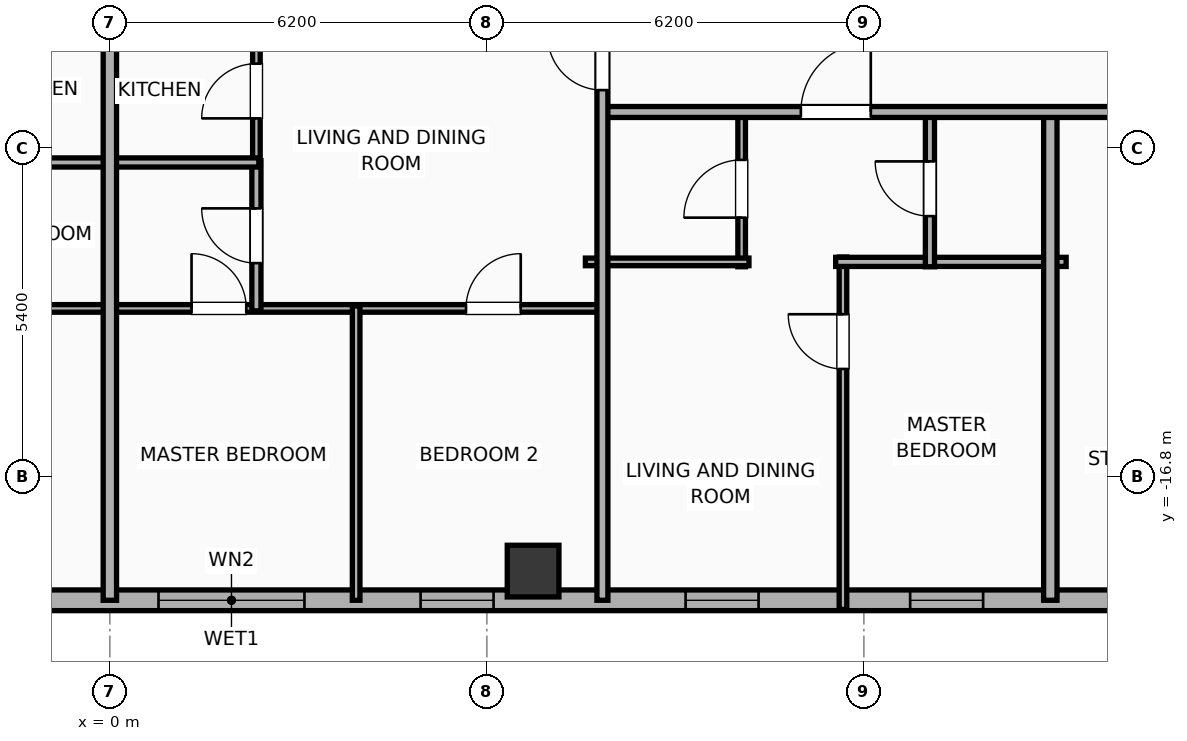
"""IFC4 building model, lengths in metres.
Left out: names, types, materials, properties, quantities, classifications, styles, units other than length and angle.
Written with IfcOpenShell. Run it as: python <this file> out.ifc"""

import sys

from ifc_helpers import new_model, si_unit, direction, frame, frame_2d, origin, origin_2d, place, context, subcontext, project, spatial, rectangle, hollow_rectangle, extrude, element, fill, save


model = new_model("IFC4")
c1 = context("Model", 3, precision=1e-05, world=origin(), true_north=direction((0.0, 1.0)))
c2 = subcontext(c1, "Body", "Model", "MODEL_VIEW")
j1 = project(units=[si_unit("LENGTHUNIT", "METRE"), si_unit("PLANEANGLEUNIT", "RADIAN")], contexts=[c1])
p1 = place(None, origin())
s1 = spatial("IfcSite", under=j1, at=p1, CompositionType="ELEMENT")
p2 = place(p1, origin())
s2 = spatial("IfcBuilding", under=s1, at=p2, CompositionType="ELEMENT")
p3 = place(p2, frame((0.0, 0.0, 223.6)))
s3 = spatial("IfcBuildingStorey", under=s2, at=p3, CompositionType="ELEMENT", Elevation=223.6)
p4 = place(p3, frame((6.96, -18.35, 0.0), z_axis=(0.0, 0.0, 1.0), x_axis=(1.0, 0.0, 0.0)))
e1 = element("IfcColumn", 1, at=p4, inside=s3, PredefinedType="COLUMN", context=c2, shape_type="SweptSolid", body=[
    extrude(hollow_rectangle(XDim=0.85, YDim=0.85, WallThickness=0.028, at=origin_2d()), origin(), (0.0, 0.0, 1.0), 3.9),
])
p5 = place(p3, frame((26.783, -18.83, 0.0), z_axis=(0.0, 0.0, 1.0), x_axis=(-1.0, 0.0, 0.0)))
e2 = element("IfcWall", 2, at=p5, inside=s3, PredefinedType="ELEMENTEDWALL", context=c2, shape_type="SweptSolid", body=[
    extrude(rectangle(XDim=49.566, YDim=0.34, at=frame_2d((24.783, 0.0))), origin(), (0.0, 0.0, 1.0), 3.65),
])
p6 = place(p5, frame((23.583, 0.0, 0.75)))
e3 = element("IfcOpeningElement", 3, at=p6, cuts=e2, PredefinedType="OPENING", context=c2, shape_type="SweptSolid", body=[
    extrude(rectangle(XDim=2.4, YDim=2.1, at=frame_2d((1.2, 1.05))), frame((0.0, 0.18, 0.0), z_axis=(0.0, -1.0, 0.0), x_axis=(1.0, 0.0, 0.0)), (0.0, 0.0, 1.0), 0.36),
])
p7 = place(p5, frame((41.756, 0.0, 0.75)))
e4 = element("IfcOpeningElement", 4, at=p7, cuts=e2, PredefinedType="OPENING", context=c2, shape_type="SweptSolid", body=[
    extrude(rectangle(XDim=2.4, YDim=2.1, at=frame_2d((1.2, 1.05))), frame((0.0, 0.18, 0.0), z_axis=(0.0, -1.0, 0.0), x_axis=(1.0, 0.0, 0.0)), (0.0, 0.0, 1.0), 0.36),
])
p8 = place(p5, frame((47.222, 0.0, 0.75)))
e5 = element("IfcOpeningElement", 5, at=p8, cuts=e2, PredefinedType="OPENING", context=c2, shape_type="SweptSolid", body=[
    extrude(rectangle(XDim=1.2, YDim=2.05, at=frame_2d((0.6, 1.025))), frame((0.0, 0.18, 0.0), z_axis=(0.0, -1.0, 0.0), x_axis=(1.0, 0.0, 0.0)), (0.0, 0.0, 1.0), 0.36),
])
p9 = place(p5, frame((45.08, 0.0, 0.75)))
e6 = element("IfcOpeningElement", 6, at=p9, cuts=e2, PredefinedType="OPENING", context=c2, shape_type="SweptSolid", body=[
    extrude(rectangle(XDim=1.2, YDim=2.05, at=frame_2d((0.6, 1.025))), frame((0.0, 0.18, 0.0), z_axis=(0.0, -1.0, 0.0), x_axis=(1.0, 0.0, 0.0)), (0.0, 0.0, 1.0), 0.36),
])
p10 = place(p5, frame((37.289, 0.0, 0.75)))
e7 = element("IfcOpeningElement", 7, at=p10, cuts=e2, PredefinedType="OPENING", context=c2, shape_type="SweptSolid", body=[
    extrude(rectangle(XDim=1.2, YDim=2.05, at=frame_2d((0.6, 1.025))), frame((0.0, 0.18, 0.0), z_axis=(0.0, -1.0, 0.0), x_axis=(1.0, 0.0, 0.0)), (0.0, 0.0, 1.0), 0.36),
])
p11 = place(p5, frame((16.115, 0.0, 0.75)))
e8 = element("IfcOpeningElement", 8, at=p11, cuts=e2, PredefinedType="OPENING", context=c2, shape_type="SweptSolid", body=[
    extrude(rectangle(XDim=1.2, YDim=2.05, at=frame_2d((0.6, 1.025))), frame((0.0, 0.18, 0.0), z_axis=(0.0, -1.0, 0.0), x_axis=(1.0, 0.0, 0.0)), (0.0, 0.0, 1.0), 0.36),
])
p12 = place(p5, frame((12.422, 0.0, 0.75)))
e9 = element("IfcOpeningElement", 9, at=p12, cuts=e2, PredefinedType="OPENING", context=c2, shape_type="SweptSolid", body=[
    extrude(rectangle(XDim=1.2, YDim=2.05, at=frame_2d((0.6, 1.025))), frame((0.0, 0.18, 0.0), z_axis=(0.0, -1.0, 0.0), x_axis=(1.0, 0.0, 0.0)), (0.0, 0.0, 1.0), 0.36),
])
p13 = place(p5, frame((8.09, 0.0, 0.75)))
e10 = element("IfcOpeningElement", 10, at=p13, cuts=e2, PredefinedType="OPENING", context=c2, shape_type="SweptSolid", body=[
    extrude(rectangle(XDim=1.2, YDim=2.05, at=frame_2d((0.6, 1.025))), frame((0.0, 0.18, 0.0), z_axis=(0.0, -1.0, 0.0), x_axis=(1.0, 0.0, 0.0)), (0.0, 0.0, 1.0), 0.36),
])
p14 = place(p5, frame((4.637, 0.0, 0.75)))
e11 = element("IfcOpeningElement", 11, at=p14, cuts=e2, PredefinedType="OPENING", context=c2, shape_type="SweptSolid", body=[
    extrude(rectangle(XDim=1.2, YDim=2.05, at=frame_2d((0.6, 1.025))), frame((0.0, 0.18, 0.0), z_axis=(0.0, -1.0, 0.0), x_axis=(1.0, 0.0, 0.0)), (0.0, 0.0, 1.0), 0.36),
])
p15 = place(p5, frame((1.811, 0.0, 0.75)))
e12 = element("IfcOpeningElement", 12, at=p15, cuts=e2, PredefinedType="OPENING", context=c2, shape_type="SweptSolid", body=[
    extrude(rectangle(XDim=1.2, YDim=2.05, at=frame_2d((0.6, 1.025))), frame((0.0, 0.18, 0.0), z_axis=(0.0, -1.0, 0.0), x_axis=(1.0, 0.0, 0.0)), (0.0, 0.0, 1.0), 0.36),
])
p16 = place(p5, frame((32.253, 0.0, 0.75)))
e13 = element("IfcOpeningElement", 13, at=p16, cuts=e2, PredefinedType="OPENING", context=c2, shape_type="SweptSolid", body=[
    extrude(rectangle(XDim=1.2, YDim=2.05, at=frame_2d((0.6, 1.025))), frame((0.0, 0.18, 0.0), z_axis=(0.0, -1.0, 0.0), x_axis=(1.0, 0.0, 0.0)), (0.0, 0.0, 1.0), 0.36),
])
p17 = place(p5, frame((27.853, 0.0, 0.75)))
e14 = element("IfcOpeningElement", 14, at=p17, cuts=e2, PredefinedType="OPENING", context=c2, shape_type="SweptSolid", body=[
    extrude(rectangle(XDim=1.2, YDim=2.05, at=frame_2d((0.6, 1.025))), frame((0.0, 0.18, 0.0), z_axis=(0.0, -1.0, 0.0), x_axis=(1.0, 0.0, 0.0)), (0.0, 0.0, 1.0), 0.36),
])
p18 = place(p5, frame((20.473, 0.0, 0.75)))
e15 = element("IfcOpeningElement", 15, at=p18, cuts=e2, PredefinedType="OPENING", context=c2, shape_type="SweptSolid", body=[
    extrude(rectangle(XDim=1.2, YDim=2.05, at=frame_2d((0.6, 1.025))), frame((0.0, 0.18, 0.0), z_axis=(0.0, -1.0, 0.0), x_axis=(1.0, 0.0, 0.0)), (0.0, 0.0, 1.0), 0.36),
])
p19 = place(p3, frame((12.056, -18.98, 0.0), z_axis=(0.0, 0.0, 1.0), x_axis=(0.0, 1.0, 0.0)))
e16 = element("IfcWall", 16, at=p19, inside=s3, PredefinedType="PARTITIONING", context=c2, shape_type="SweptSolid", body=[
    extrude(rectangle(XDim=5.795, YDim=0.125, at=frame_2d((2.897, 0.0))), origin(), (0.0, 0.0, 1.0), 3.65),
])
p20 = place(p19, frame((3.954, 0.0, 0.0)))
e17 = element("IfcOpeningElement", 17, at=p20, cuts=e16, PredefinedType="OPENING", context=c2, shape_type="SweptSolid", body=[
    extrude(rectangle(XDim=0.9, YDim=2.05, at=frame_2d((0.45, 1.025))), frame((0.0, 0.073, 0.0), z_axis=(0.0, -1.0, 0.0), x_axis=(1.0, 0.0, 0.0)), (0.0, 0.0, 1.0), 0.145),
])
p21 = place(p3, frame((11.936, -13.265, 0.0), z_axis=(0.0, 0.0, 1.0), x_axis=(1.0, 0.0, 0.0)))
e18 = element("IfcWall", 18, at=p21, inside=s3, PredefinedType="PLUMBINGWALL", context=c2, shape_type="SweptSolid", body=[
    extrude(rectangle(XDim=3.79, YDim=0.15, at=frame_2d((1.895, 0.0))), origin(), (0.0, 0.0, 1.0), 3.65),
])
p22 = place(p3, frame((10.39, -13.345, 0.0), z_axis=(0.0, 0.0, 1.0), x_axis=(0.0, 1.0, 0.0)))
e19 = element("IfcWall", 19, at=p22, inside=s3, PredefinedType="PARTITIONING", context=c2, shape_type="SweptSolid", body=[
    extrude(rectangle(XDim=2.565, YDim=0.125, at=frame_2d((1.282, 0.0))), origin(), (0.0, 0.0, 1.0), 3.65),
])
p23 = place(p22, frame((0.808, 0.0, 0.0)))
e20 = element("IfcOpeningElement", 20, at=p23, cuts=e19, PredefinedType="OPENING", context=c2, shape_type="SweptSolid", body=[
    extrude(rectangle(XDim=0.95, YDim=2.05, at=frame_2d((0.475, 1.025))), frame((0.0, 0.073, 0.0), z_axis=(0.0, -1.0, 0.0), x_axis=(1.0, 0.0, 0.0)), (0.0, 0.0, 1.0), 0.145),
])
p24 = place(p3, frame((7.82, -13.265, 0.0), z_axis=(0.0, 0.0, 1.0), x_axis=(1.0, 0.0, 0.0)))
e21 = element("IfcWall", 21, at=p24, inside=s3, PredefinedType="PARTITIONING", context=c2, shape_type="SweptSolid", body=[
    extrude(rectangle(XDim=2.69, YDim=0.125, at=frame_2d((1.345, 0.0))), origin(), (0.0, 0.0, 1.0), 3.65),
])
p25 = place(p3, frame((13.486, -13.345, 0.0), z_axis=(0.0, 0.0, 1.0), x_axis=(0.0, 1.0, 0.0)))
e22 = element("IfcWall", 22, at=p25, inside=s3, PredefinedType="PLUMBINGWALL", context=c2, shape_type="SweptSolid", body=[
    extrude(rectangle(XDim=2.565, YDim=0.15, at=frame_2d((1.282, 0.0))), origin(), (0.0, 0.0, 1.0), 3.65),
])
p26 = place(p25, frame((0.833, 0.0, 0.0)))
e23 = element("IfcOpeningElement", 23, at=p26, cuts=e22, PredefinedType="OPENING", context=c2, shape_type="SweptSolid", body=[
    extrude(rectangle(XDim=0.9, YDim=2.05, at=frame_2d((0.45, 1.025))), frame((0.0, 0.085, 0.0), z_axis=(0.0, -1.0, 0.0), x_axis=(1.0, 0.0, 0.0)), (0.0, 0.0, 1.0), 0.17),
])
p27 = place(p3, frame((15.466, -18.83, 0.0), z_axis=(0.0, 0.0, 1.0), x_axis=(0.0, 1.0, 0.0)))
e24 = element("IfcWall", 24, at=p27, inside=s3, PredefinedType="PARTITIONING", context=c2, shape_type="SweptSolid", body=[
    extrude(rectangle(XDim=8.11, YDim=0.22, at=frame_2d((4.055, 0.0))), origin(), (0.0, 0.0, 1.0), 3.65),
])
p28 = place(p3, frame((8.08, -10.8, 0.0), z_axis=(0.0, 0.0, 1.0), x_axis=(1.0, 0.0, 0.0)))
e25 = element("IfcWall", 25, at=p28, inside=s3, PredefinedType="PARTITIONING", context=c2, shape_type="SweptSolid", body=[
    extrude(rectangle(XDim=22.15, YDim=0.18, at=frame_2d((11.075, 0.0))), origin(), (0.0, 0.0, 1.0), 3.65),
])
p29 = place(p28, frame((3.283, 0.0, 0.0)))
e26 = element("IfcOpeningElement", 26, at=p29, cuts=e25, PredefinedType="OPENING", context=c2, shape_type="SweptSolid", body=[
    extrude(rectangle(XDim=1.15, YDim=2.05, at=frame_2d((0.575, 1.025))), frame((0.0, 0.1, 0.0), z_axis=(0.0, -1.0, 0.0), x_axis=(1.0, 0.0, 0.0)), (0.0, 0.0, 1.0), 0.2),
])
p30 = place(p28, frame((9.229, 0.0, 0.0)))
e27 = element("IfcOpeningElement", 27, at=p30, cuts=e25, PredefinedType="OPENING", context=c2, shape_type="SweptSolid", body=[
    extrude(rectangle(XDim=1.15, YDim=2.05, at=frame_2d((0.575, 1.025))), frame((0.0, 0.1, 0.0), z_axis=(0.0, -1.0, 0.0), x_axis=(1.0, 0.0, 0.0)), (0.0, 0.0, 1.0), 0.2),
])
p31 = place(p28, frame((18.084, 0.0, 0.0)))
e28 = element("IfcOpeningElement", 28, at=p31, cuts=e25, PredefinedType="OPENING", context=c2, shape_type="SweptSolid", body=[
    extrude(rectangle(XDim=1.15, YDim=2.05, at=frame_2d((0.575, 1.025))), frame((0.0, 0.1, 0.0), z_axis=(0.0, -1.0, 0.0), x_axis=(1.0, 0.0, 0.0)), (0.0, 0.0, 1.0), 0.2),
])
p32 = place(p3, frame((-8.08, -14.03, 0.0), z_axis=(0.0, 0.0, 1.0), x_axis=(1.0, 0.0, 0.0)))
e29 = element("IfcWall", 29, at=p32, inside=s3, PredefinedType="PARTITIONING", context=c2, shape_type="SweptSolid", body=[
    extrude(rectangle(XDim=8.06, YDim=0.125, at=frame_2d((4.03, 0.0))), origin(), (0.0, 0.0, 1.0), 3.65),
])
p33 = place(p32, frame((1.323, 0.0, 0.0)))
e30 = element("IfcOpeningElement", 30, at=p33, cuts=e29, PredefinedType="OPENING", context=c2, shape_type="SweptSolid", body=[
    extrude(rectangle(XDim=0.9, YDim=2.05, at=frame_2d((0.45, 1.025))), frame((0.0, 0.073, 0.0), z_axis=(0.0, -1.0, 0.0), x_axis=(1.0, 0.0, 0.0)), (0.0, 0.0, 1.0), 0.145),
])
p34 = place(p32, frame((4.547, 0.0, 0.0)))
e31 = element("IfcOpeningElement", 31, at=p34, cuts=e29, PredefinedType="OPENING", context=c2, shape_type="SweptSolid", body=[
    extrude(rectangle(XDim=0.9, YDim=2.05, at=frame_2d((0.45, 1.025))), frame((0.0, 0.073, 0.0), z_axis=(0.0, -1.0, 0.0), x_axis=(1.0, 0.0, 0.0)), (0.0, 0.0, 1.0), 0.145),
])
p35 = place(p3, frame((-2.45, -11.63, 0.0), z_axis=(0.0, 0.0, 1.0), x_axis=(1.0, 0.0, 0.0)))
e32 = element("IfcWall", 32, at=p35, inside=s3, PredefinedType="PLUMBINGWALL", context=c2, shape_type="SweptSolid", body=[
    extrude(rectangle(XDim=2.43, YDim=0.15, at=frame_2d((1.215, 0.0))), origin(), (0.0, 0.0, 1.0), 3.65),
])
p36 = place(p3, frame((0.02, -14.03, 0.0), z_axis=(0.0, 0.0, 1.0), x_axis=(1.0, 0.0, 0.0)))
e33 = element("IfcWall", 33, at=p36, inside=s3, PredefinedType="PARTITIONING", context=c2, shape_type="SweptSolid", body=[
    extrude(rectangle(XDim=8.06, YDim=0.125, at=frame_2d((4.03, 0.0))), origin(), (0.0, 0.0, 1.0), 3.65),
])
p37 = place(p36, frame((1.323, 0.0, 0.0)))
e34 = element("IfcOpeningElement", 34, at=p37, cuts=e33, PredefinedType="OPENING", context=c2, shape_type="SweptSolid", body=[
    extrude(rectangle(XDim=0.9, YDim=2.05, at=frame_2d((0.45, 1.025))), frame((0.0, 0.073, 0.0), z_axis=(0.0, -1.0, 0.0), x_axis=(1.0, 0.0, 0.0)), (0.0, 0.0, 1.0), 0.145),
])
p38 = place(p36, frame((5.837, 0.0, 0.0)))
e35 = element("IfcOpeningElement", 35, at=p38, cuts=e33, PredefinedType="OPENING", context=c2, shape_type="SweptSolid", body=[
    extrude(rectangle(XDim=0.9, YDim=2.05, at=frame_2d((0.45, 1.025))), frame((0.0, 0.073, 0.0), z_axis=(0.0, -1.0, 0.0), x_axis=(1.0, 0.0, 0.0)), (0.0, 0.0, 1.0), 0.145),
])
p39 = place(p3, frame((2.41, -11.66, 0.0), z_axis=(0.0, 0.0, 1.0), x_axis=(0.0, 1.0, 0.0)))
e36 = element("IfcWall", 36, at=p39, inside=s3, PredefinedType="PARTITIONING", context=c2, shape_type="SweptSolid", body=[
    extrude(rectangle(XDim=2.41, YDim=0.125, at=frame_2d((1.205, 0.0))), origin(), (0.0, 0.0, 1.0), 3.65),
])
p40 = place(p39, frame((0.755, 0.0, 0.0)))
e37 = element("IfcOpeningElement", 37, at=p40, cuts=e36, PredefinedType="OPENING", context=c2, shape_type="SweptSolid", body=[
    extrude(rectangle(XDim=0.9, YDim=2.05, at=frame_2d((0.45, 1.025))), frame((0.0, 0.073, 0.0), z_axis=(0.0, -1.0, 0.0), x_axis=(1.0, 0.0, 0.0)), (0.0, 0.0, 1.0), 0.145),
])
p41 = place(p3, frame((2.41, -14.07, 0.0), z_axis=(0.0, 0.0, 1.0), x_axis=(0.0, 1.0, 0.0)))
e38 = element("IfcWall", 38, at=p41, inside=s3, PredefinedType="PLUMBINGWALL", context=c2, shape_type="SweptSolid", body=[
    extrude(rectangle(XDim=2.47, YDim=0.15, at=frame_2d((1.235, 0.0))), origin(), (0.0, 0.0, 1.0), 3.65),
])
p42 = place(p41, frame((0.785, 0.0, 0.0)))
e39 = element("IfcOpeningElement", 39, at=p42, cuts=e38, PredefinedType="OPENING", context=c2, shape_type="SweptSolid", body=[
    extrude(rectangle(XDim=0.9, YDim=2.05, at=frame_2d((0.45, 1.025))), frame((0.0, 0.085, 0.0), z_axis=(0.0, -1.0, 0.0), x_axis=(1.0, 0.0, 0.0)), (0.0, 0.0, 1.0), 0.17),
])
p43 = place(p3, frame((0.02, -11.63, 0.0), z_axis=(0.0, 0.0, 1.0), x_axis=(1.0, 0.0, 0.0)))
e40 = element("IfcWall", 40, at=p43, inside=s3, PredefinedType="PLUMBINGWALL", context=c2, shape_type="SweptSolid", body=[
    extrude(rectangle(XDim=2.43, YDim=0.15, at=frame_2d((1.215, 0.0))), origin(), (0.0, 0.0, 1.0), 3.65),
])
p44 = place(p3, frame((4.05, -18.83, 0.0), z_axis=(0.0, 0.0, 1.0), x_axis=(0.0, 1.0, 0.0)))
e41 = element("IfcWall", 41, at=p44, inside=s3, PredefinedType="PARTITIONING", context=c2, shape_type="SweptSolid", body=[
    extrude(rectangle(XDim=4.84, YDim=0.125, at=frame_2d((2.42, 0.0))), origin(), (0.0, 0.0, 1.0), 3.65),
])
p45 = place(p3, frame((8.1, -18.83, 0.0), z_axis=(0.0, 0.0, 1.0), x_axis=(0.0, 1.0, 0.0)))
e42 = element("IfcWall", 42, at=p45, inside=s3, PredefinedType="PARTITIONING", context=c2, shape_type="SweptSolid", body=[
    extrude(rectangle(XDim=9.64, YDim=0.18, at=frame_2d((4.82, 0.0))), origin(), (0.0, 0.0, 1.0), 3.65),
])
p46 = place(p45, frame((8.39, 0.0, 0.0)))
e43 = element("IfcOpeningElement", 43, at=p46, cuts=e42, PredefinedType="OPENING", context=c2, shape_type="SweptSolid", body=[
    extrude(rectangle(XDim=0.9, YDim=2.05, at=frame_2d((0.45, 1.025))), frame((0.0, 0.1, 0.0), z_axis=(0.0, -1.0, 0.0), x_axis=(1.0, 0.0, 0.0)), (0.0, 0.0, 1.0), 0.2),
])
p47 = place(p3, frame((0.0, -18.83, 0.0), z_axis=(0.0, 0.0, 1.0), x_axis=(0.0, 1.0, 0.0)))
e44 = element("IfcWall", 44, at=p47, inside=s3, PredefinedType="PARTITIONING", context=c2, shape_type="SweptSolid", body=[
    extrude(rectangle(XDim=9.64, YDim=0.22, at=frame_2d((4.82, 0.0))), origin(), (0.0, 0.0, 1.0), 3.65),
])
p48 = place(p6, origin())
e45 = element("IfcWindow", 45, at=p48, inside=s3, PartitioningType="SINGLE_PANEL", PredefinedType="WINDOW", context=c2, shape_type="SweptSolid", body=[
    extrude(rectangle(XDim=2.4, YDim=2.1, at=frame_2d((1.2, 1.05))), frame((0.0, 0.03, 0.0), z_axis=(0.0, -1.0, 0.0), x_axis=(1.0, 0.0, 0.0)), (0.0, 0.0, 1.0), 0.06),
])
fill(e3, e45)
p49 = place(p11, origin())
e46 = element("IfcWindow", 46, at=p49, inside=s3, PartitioningType="SINGLE_PANEL", PredefinedType="WINDOW", context=c2, shape_type="SweptSolid", body=[
    extrude(rectangle(XDim=1.2, YDim=2.05, at=frame_2d((0.6, 1.025))), frame((0.0, 0.03, 0.0), z_axis=(0.0, -1.0, 0.0), x_axis=(1.0, 0.0, 0.0)), (0.0, 0.0, 1.0), 0.06),
])
fill(e8, e46)
p50 = place(p12, origin())
e47 = element("IfcWindow", 47, at=p50, inside=s3, PartitioningType="SINGLE_PANEL", PredefinedType="WINDOW", context=c2, shape_type="SweptSolid", body=[
    extrude(rectangle(XDim=1.2, YDim=2.05, at=frame_2d((0.6, 1.025))), frame((0.0, 0.03, 0.0), z_axis=(0.0, -1.0, 0.0), x_axis=(1.0, 0.0, 0.0)), (0.0, 0.0, 1.0), 0.06),
])
fill(e9, e47)
p51 = place(p18, origin())
e48 = element("IfcWindow", 48, at=p51, inside=s3, PartitioningType="SINGLE_PANEL", PredefinedType="WINDOW", context=c2, shape_type="SweptSolid", body=[
    extrude(rectangle(XDim=1.2, YDim=2.05, at=frame_2d((0.6, 1.025))), frame((0.0, 0.03, 0.0), z_axis=(0.0, -1.0, 0.0), x_axis=(1.0, 0.0, 0.0)), (0.0, 0.0, 1.0), 0.06),
])
fill(e15, e48)
p52 = place(p20, origin())
e49 = element("IfcDoor", 49, at=p52, inside=s3, OperationType="SINGLE_SWING_RIGHT", PredefinedType="DOOR", context=c2, shape_type="SweptSolid", body=[
    extrude(rectangle(XDim=0.9, YDim=2.05, at=frame_2d((0.45, 1.025))), frame((0.0, 0.025, 0.0), z_axis=(0.0, -1.0, 0.0), x_axis=(1.0, 0.0, 0.0)), (0.0, 0.0, 1.0), 0.05),
])
fill(e17, e49)
p53 = place(p23, origin())
e50 = element("IfcDoor", 50, at=p53, inside=s3, OperationType="SINGLE_SWING_LEFT", PredefinedType="DOOR", context=c2, shape_type="SweptSolid", body=[
    extrude(rectangle(XDim=0.95, YDim=2.05, at=frame_2d((0.475, 1.025))), frame((0.0, 0.025, 0.0), z_axis=(0.0, -1.0, 0.0), x_axis=(1.0, 0.0, 0.0)), (0.0, 0.0, 1.0), 0.05),
])
fill(e20, e50)
p54 = place(p26, origin())
e51 = element("IfcDoor", 51, at=p54, inside=s3, OperationType="SINGLE_SWING_RIGHT", PredefinedType="DOOR", context=c2, shape_type="SweptSolid", body=[
    extrude(rectangle(XDim=0.9, YDim=2.05, at=frame_2d((0.45, 1.025))), frame((0.0, 0.025, 0.0), z_axis=(0.0, -1.0, 0.0), x_axis=(1.0, 0.0, 0.0)), (0.0, 0.0, 1.0), 0.05),
])
fill(e23, e51)
p55 = place(p29, origin())
e52 = element("IfcDoor", 52, at=p55, inside=s3, OperationType="SINGLE_SWING_RIGHT", PredefinedType="DOOR", context=c2, shape_type="SweptSolid", body=[
    extrude(rectangle(XDim=1.15, YDim=2.05, at=frame_2d((0.575, 1.025))), frame((0.0, 0.025, 0.0), z_axis=(0.0, -1.0, 0.0), x_axis=(1.0, 0.0, 0.0)), (0.0, 0.0, 1.0), 0.05),
])
fill(e26, e52)
p56 = place(p37, origin())
e53 = element("IfcDoor", 53, at=p56, inside=s3, OperationType="SINGLE_SWING_LEFT", PredefinedType="DOOR", context=c2, shape_type="SweptSolid", body=[
    extrude(rectangle(XDim=0.9, YDim=2.05, at=frame_2d((0.45, 1.025))), frame((0.0, 0.025, 0.0), z_axis=(0.0, -1.0, 0.0), x_axis=(1.0, 0.0, 0.0)), (0.0, 0.0, 1.0), 0.05),
])
fill(e34, e53)
p57 = place(p38, origin())
e54 = element("IfcDoor", 54, at=p57, inside=s3, OperationType="SINGLE_SWING_RIGHT", PredefinedType="DOOR", context=c2, shape_type="SweptSolid", body=[
    extrude(rectangle(XDim=0.9, YDim=2.05, at=frame_2d((0.45, 1.025))), frame((0.0, 0.025, 0.0), z_axis=(0.0, -1.0, 0.0), x_axis=(1.0, 0.0, 0.0)), (0.0, 0.0, 1.0), 0.05),
])
fill(e35, e54)
p58 = place(p40, origin())
e55 = element("IfcDoor", 55, at=p58, inside=s3, OperationType="SINGLE_SWING_LEFT", PredefinedType="DOOR", context=c2, shape_type="SweptSolid", body=[
    extrude(rectangle(XDim=0.9, YDim=2.05, at=frame_2d((0.45, 1.025))), frame((0.0, 0.025, 0.0), z_axis=(0.0, -1.0, 0.0), x_axis=(1.0, 0.0, 0.0)), (0.0, 0.0, 1.0), 0.05),
])
fill(e37, e55)
p59 = place(p42, origin())
e56 = element("IfcDoor", 56, at=p59, inside=s3, OperationType="SINGLE_SWING_RIGHT", PredefinedType="DOOR", context=c2, shape_type="SweptSolid", body=[
    extrude(rectangle(XDim=0.9, YDim=2.05, at=frame_2d((0.45, 1.025))), frame((0.0, 0.025, 0.0), z_axis=(0.0, -1.0, 0.0), x_axis=(1.0, 0.0, 0.0)), (0.0, 0.0, 1.0), 0.05),
])
fill(e39, e56)
p60 = place(p46, origin())
e57 = element("IfcDoor", 57, at=p60, inside=s3, OperationType="SINGLE_SWING_RIGHT", PredefinedType="DOOR", context=c2, shape_type="SweptSolid", body=[
    extrude(rectangle(XDim=0.9, YDim=2.05, at=frame_2d((0.45, 1.025))), frame((0.0, 0.025, 0.0), z_axis=(0.0, -1.0, 0.0), x_axis=(1.0, 0.0, 0.0)), (0.0, 0.0, 1.0), 0.05),
])
fill(e43, e57)
save(model, sys.argv[1])
